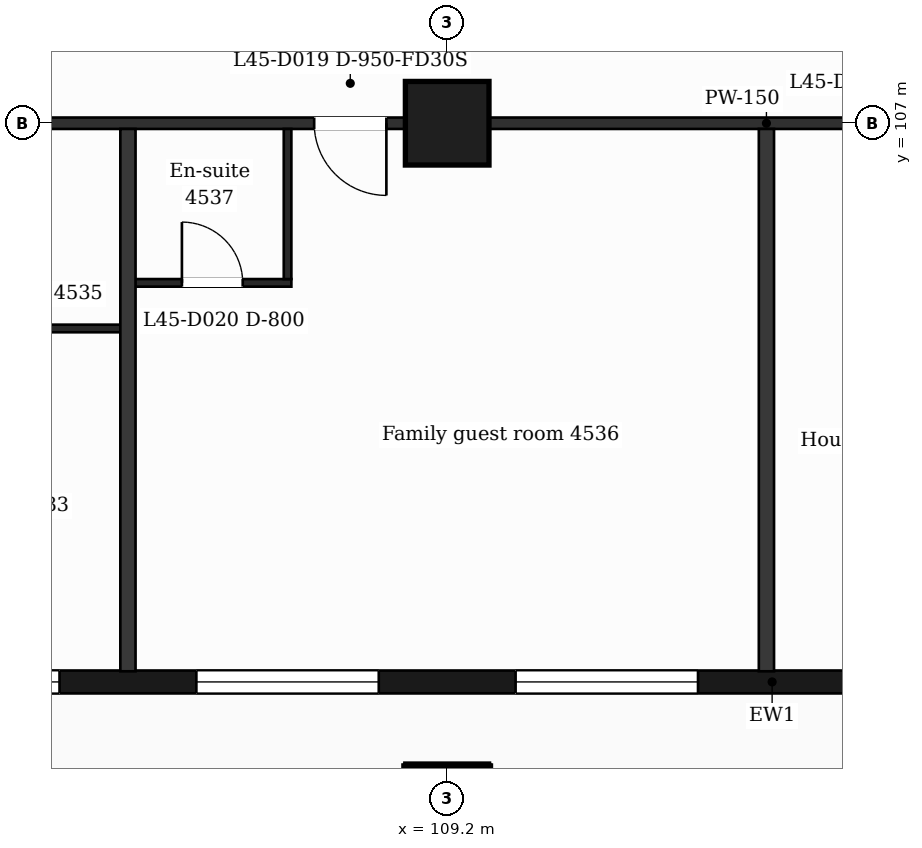
"""IFC4 building model, lengths in metres.
Left out: names, types, materials, properties, quantities, classifications, styles, units other than length and angle.
Written with IfcOpenShell. Run it as: python <this file> out.ifc"""

import sys

from ifc_helpers import new_model, si_unit, direction, frame, frame_2d, origin, origin_2d, place, context, subcontext, project, spatial, rectangle, extrude, element, fill, save


model = new_model("IFC4")
c1 = context("Model", 3, precision=1e-05, world=origin(), true_north=direction((0.0, 1.0)))
c2 = subcontext(c1, "Body", "Model", "MODEL_VIEW")
j1 = project(units=[si_unit("LENGTHUNIT", "METRE"), si_unit("PLANEANGLEUNIT", "RADIAN")], contexts=[c1])
p1 = place(None, origin())
s1 = spatial("IfcSite", under=j1, at=p1, CompositionType="ELEMENT")
p2 = place(p1, origin())
s2 = spatial("IfcBuilding", under=s1, at=p2, CompositionType="ELEMENT")
p3 = place(p2, frame((0.0, 0.0, 188.5)))
s3 = spatial("IfcBuildingStorey", under=s2, at=p3, CompositionType="ELEMENT", Elevation=188.5)
for number, where, z_axis, x_axis in (
    (1, (109.2, 98.0, 0.0), (0.0, 0.0, 1.0), (1.0, 0.0, 0.0)),
    (2, (109.2, 107.0, 0.0), (0.0, 0.0, 1.0), (1.0, 0.0, 0.0)),
):
    element("IfcColumn", number, at=place(p3, frame(where, z_axis=z_axis, x_axis=x_axis)), inside=s3, PredefinedType="COLUMN", context=c2, shape_type="SweptSolid", body=[
        extrude(rectangle(XDim=1.1, YDim=1.1, at=origin_2d()), origin(), (0.0, 0.0, 1.0), 3.7),
    ])
p4 = place(p3, frame((89.85, 99.65, 0.0), z_axis=(0.0, 0.0, 1.0), x_axis=(1.0, 0.0, 0.0)))
e3 = element("IfcWall", 3, at=p4, inside=s3, PredefinedType="SOLIDWALL", context=c2, shape_type="SweptSolid", body=[
    extrude(rectangle(XDim=47.25, YDim=0.3, at=frame_2d((23.625, 0.0))), origin(), (0.0, 0.0, 1.0), 3.25),
])
p5 = place(p4, frame((0.725, 0.0, 0.9)))
e4 = element("IfcOpeningElement", 4, at=p5, cuts=e3, PredefinedType="OPENING", context=c2, shape_type="SweptSolid", body=[
    extrude(rectangle(XDim=1.2, YDim=2.1, at=frame_2d((0.6, 1.05))), frame((0.0, 0.16, 0.0), z_axis=(0.0, -1.0, 0.0), x_axis=(1.0, 0.0, 0.0)), (0.0, 0.0, 1.0), 0.32),
])
p6 = place(p4, frame((3.45, 0.0, 0.9)))
e5 = element("IfcOpeningElement", 5, at=p6, cuts=e3, PredefinedType="OPENING", context=c2, shape_type="SweptSolid", body=[
    extrude(rectangle(XDim=2.4, YDim=2.1, at=frame_2d((1.2, 1.05))), frame((0.0, 0.16, 0.0), z_axis=(0.0, -1.0, 0.0), x_axis=(1.0, 0.0, 0.0)), (0.0, 0.0, 1.0), 0.32),
])
p7 = place(p4, frame((7.65, 0.0, 0.9)))
e6 = element("IfcOpeningElement", 6, at=p7, cuts=e3, PredefinedType="OPENING", context=c2, shape_type="SweptSolid", body=[
    extrude(rectangle(XDim=2.4, YDim=2.1, at=frame_2d((1.2, 1.05))), frame((0.0, 0.16, 0.0), z_axis=(0.0, -1.0, 0.0), x_axis=(1.0, 0.0, 0.0)), (0.0, 0.0, 1.0), 0.32),
])
p8 = place(p4, frame((11.85, 0.0, 0.9)))
e7 = element("IfcOpeningElement", 7, at=p8, cuts=e3, PredefinedType="OPENING", context=c2, shape_type="SweptSolid", body=[
    extrude(rectangle(XDim=2.4, YDim=2.1, at=frame_2d((1.2, 1.05))), frame((0.0, 0.16, 0.0), z_axis=(0.0, -1.0, 0.0), x_axis=(1.0, 0.0, 0.0)), (0.0, 0.0, 1.0), 0.32),
])
p9 = place(p4, frame((16.05, 0.0, 0.9)))
e8 = element("IfcOpeningElement", 8, at=p9, cuts=e3, PredefinedType="OPENING", context=c2, shape_type="SweptSolid", body=[
    extrude(rectangle(XDim=2.4, YDim=2.1, at=frame_2d((1.2, 1.05))), frame((0.0, 0.16, 0.0), z_axis=(0.0, -1.0, 0.0), x_axis=(1.0, 0.0, 0.0)), (0.0, 0.0, 1.0), 0.32),
])
p10 = place(p4, frame((20.25, 0.0, 0.9)))
e9 = element("IfcOpeningElement", 9, at=p10, cuts=e3, PredefinedType="OPENING", context=c2, shape_type="SweptSolid", body=[
    extrude(rectangle(XDim=2.4, YDim=2.1, at=frame_2d((1.2, 1.05))), frame((0.0, 0.16, 0.0), z_axis=(0.0, -1.0, 0.0), x_axis=(1.0, 0.0, 0.0)), (0.0, 0.0, 1.0), 0.32),
])
p11 = place(p4, frame((25.05, 0.0, 0.9)))
e10 = element("IfcOpeningElement", 10, at=p11, cuts=e3, PredefinedType="OPENING", context=c2, shape_type="SweptSolid", body=[
    extrude(rectangle(XDim=1.2, YDim=2.1, at=frame_2d((0.6, 1.05))), frame((0.0, 0.16, 0.0), z_axis=(0.0, -1.0, 0.0), x_axis=(1.0, 0.0, 0.0)), (0.0, 0.0, 1.0), 0.32),
])
p12 = place(p4, frame((29.25, 0.0, 0.9)))
e11 = element("IfcOpeningElement", 11, at=p12, cuts=e3, PredefinedType="OPENING", context=c2, shape_type="SweptSolid", body=[
    extrude(rectangle(XDim=1.2, YDim=2.1, at=frame_2d((0.6, 1.05))), frame((0.0, 0.16, 0.0), z_axis=(0.0, -1.0, 0.0), x_axis=(1.0, 0.0, 0.0)), (0.0, 0.0, 1.0), 0.32),
])
p13 = place(p4, frame((32.55, 0.0, 0.0)))
e12 = element("IfcOpeningElement", 12, at=p13, cuts=e3, PredefinedType="OPENING", context=c2, shape_type="SweptSolid", body=[
    extrude(rectangle(XDim=1.2, YDim=2.4, at=frame_2d((0.6, 1.2))), frame((0.0, 0.16, 0.0), z_axis=(0.0, -1.0, 0.0), x_axis=(1.0, 0.0, 0.0)), (0.0, 0.0, 1.0), 0.32),
])
p14 = place(p4, frame((34.35, 0.0, 0.9)))
e13 = element("IfcOpeningElement", 13, at=p14, cuts=e3, PredefinedType="OPENING", context=c2, shape_type="SweptSolid", body=[
    extrude(rectangle(XDim=1.2, YDim=2.1, at=frame_2d((0.6, 1.05))), frame((0.0, 0.16, 0.0), z_axis=(0.0, -1.0, 0.0), x_axis=(1.0, 0.0, 0.0)), (0.0, 0.0, 1.0), 0.32),
])
p15 = place(p4, frame((37.05, 0.0, 0.9)))
e14 = element("IfcOpeningElement", 14, at=p15, cuts=e3, PredefinedType="OPENING", context=c2, shape_type="SweptSolid", body=[
    extrude(rectangle(XDim=2.4, YDim=2.1, at=frame_2d((1.2, 1.05))), frame((0.0, 0.16, 0.0), z_axis=(0.0, -1.0, 0.0), x_axis=(1.0, 0.0, 0.0)), (0.0, 0.0, 1.0), 0.32),
])
p16 = place(p4, frame((40.95, 0.0, 0.0)))
e15 = element("IfcOpeningElement", 15, at=p16, cuts=e3, PredefinedType="OPENING", context=c2, shape_type="SweptSolid", body=[
    extrude(rectangle(XDim=1.2, YDim=2.4, at=frame_2d((0.6, 1.2))), frame((0.0, 0.16, 0.0), z_axis=(0.0, -1.0, 0.0), x_axis=(1.0, 0.0, 0.0)), (0.0, 0.0, 1.0), 0.32),
])
p17 = place(p4, frame((42.75, 0.0, 0.9)))
e16 = element("IfcOpeningElement", 16, at=p17, cuts=e3, PredefinedType="OPENING", context=c2, shape_type="SweptSolid", body=[
    extrude(rectangle(XDim=1.2, YDim=2.1, at=frame_2d((0.6, 1.05))), frame((0.0, 0.16, 0.0), z_axis=(0.0, -1.0, 0.0), x_axis=(1.0, 0.0, 0.0)), (0.0, 0.0, 1.0), 0.32),
])
p18 = place(p4, frame((45.25, 0.0, 0.9)))
e17 = element("IfcOpeningElement", 17, at=p18, cuts=e3, PredefinedType="OPENING", context=c2, shape_type="SweptSolid", body=[
    extrude(rectangle(XDim=1.2, YDim=2.1, at=frame_2d((0.6, 1.05))), frame((0.0, 0.16, 0.0), z_axis=(0.0, -1.0, 0.0), x_axis=(1.0, 0.0, 0.0)), (0.0, 0.0, 1.0), 0.32),
])
p19 = place(p3, frame((102.55, 104.3, 0.0), z_axis=(0.0, 0.0, 1.0), x_axis=(1.0, 0.0, 0.0)))
e18 = element("IfcWall", 18, at=p19, inside=s3, PredefinedType="PARTITIONING", context=c2, shape_type="SweptSolid", body=[
    extrude(rectangle(XDim=2.45, YDim=0.1, at=frame_2d((1.225, 0.0))), origin(), (0.0, 0.0, 1.0), 3.25),
])
p20 = place(p3, frame((105.0, 104.9, 0.0), z_axis=(0.0, 0.0, 1.0), x_axis=(1.0, 0.0, 0.0)))
e19 = element("IfcWall", 19, at=p20, inside=s3, PredefinedType="PARTITIONING", context=c2, shape_type="SweptSolid", body=[
    extrude(rectangle(XDim=2.15, YDim=0.1, at=frame_2d((1.075, 0.0))), origin(), (0.0, 0.0, 1.0), 3.25),
])
p21 = place(p20, frame((0.71, 0.0, 0.0)))
e20 = element("IfcOpeningElement", 20, at=p21, cuts=e19, PredefinedType="OPENING", context=c2, shape_type="SweptSolid", body=[
    extrude(rectangle(XDim=0.8, YDim=2.1, at=frame_2d((0.4, 1.05))), frame((0.0, 0.06, 0.0), z_axis=(0.0, -1.0, 0.0), x_axis=(1.0, 0.0, 0.0)), (0.0, 0.0, 1.0), 0.12),
])
p22 = place(p3, frame((87.018, 107.0, 0.0), z_axis=(0.0, 0.0, 1.0), x_axis=(1.0, 0.0, 0.0)))
e21 = element("IfcWall", 21, at=p22, inside=s3, PredefinedType="PARTITIONING", context=c2, shape_type="SweptSolid", body=[
    extrude(rectangle(XDim=52.765, YDim=0.15, at=frame_2d((26.382, 0.0))), origin(), (0.0, 0.0, 1.0), 3.25),
])
p23 = place(p22, frame((0.87, 0.0, 0.0)))
e22 = element("IfcOpeningElement", 22, at=p23, cuts=e21, PredefinedType="OPENING", context=c2, shape_type="SweptSolid", body=[
    extrude(rectangle(XDim=0.95, YDim=2.1, at=frame_2d((0.475, 1.05))), frame((0.0, 0.085, 0.0), z_axis=(0.0, -1.0, 0.0), x_axis=(1.0, 0.0, 0.0)), (0.0, 0.0, 1.0), 0.17),
])
p24 = place(p22, frame((10.757, 0.0, 0.0)))
e23 = element("IfcOpeningElement", 23, at=p24, cuts=e21, PredefinedType="OPENING", context=c2, shape_type="SweptSolid", body=[
    extrude(rectangle(XDim=1.0, YDim=2.1, at=frame_2d((0.5, 1.05))), frame((0.0, 0.085, 0.0), z_axis=(0.0, -1.0, 0.0), x_axis=(1.0, 0.0, 0.0)), (0.0, 0.0, 1.0), 0.17),
])
p25 = place(p22, frame((20.432, 0.0, 0.0)))
e24 = element("IfcOpeningElement", 24, at=p25, cuts=e21, PredefinedType="OPENING", context=c2, shape_type="SweptSolid", body=[
    extrude(rectangle(XDim=0.95, YDim=2.1, at=frame_2d((0.475, 1.05))), frame((0.0, 0.085, 0.0), z_axis=(0.0, -1.0, 0.0), x_axis=(1.0, 0.0, 0.0)), (0.0, 0.0, 1.0), 0.17),
])
p26 = place(p22, frame((27.752, 0.0, 0.0)))
e25 = element("IfcOpeningElement", 25, at=p26, cuts=e21, PredefinedType="OPENING", context=c2, shape_type="SweptSolid", body=[
    extrude(rectangle(XDim=0.95, YDim=2.1, at=frame_2d((0.475, 1.05))), frame((0.0, 0.085, 0.0), z_axis=(0.0, -1.0, 0.0), x_axis=(1.0, 0.0, 0.0)), (0.0, 0.0, 1.0), 0.17),
])
p27 = place(p22, frame((33.557, 0.0, 0.0)))
e26 = element("IfcOpeningElement", 26, at=p27, cuts=e21, PredefinedType="OPENING", context=c2, shape_type="SweptSolid", body=[
    extrude(rectangle(XDim=0.95, YDim=2.1, at=frame_2d((0.475, 1.05))), frame((0.0, 0.085, 0.0), z_axis=(0.0, -1.0, 0.0), x_axis=(1.0, 0.0, 0.0)), (0.0, 0.0, 1.0), 0.17),
])
p28 = place(p22, frame((35.057, 0.0, 0.0)))
e27 = element("IfcOpeningElement", 27, at=p28, cuts=e21, PredefinedType="OPENING", context=c2, shape_type="SweptSolid", body=[
    extrude(rectangle(XDim=0.95, YDim=2.1, at=frame_2d((0.475, 1.05))), frame((0.0, 0.085, 0.0), z_axis=(0.0, -1.0, 0.0), x_axis=(1.0, 0.0, 0.0)), (0.0, 0.0, 1.0), 0.17),
])
p29 = place(p22, frame((45.407, 0.0, 0.0)))
e28 = element("IfcOpeningElement", 28, at=p29, cuts=e21, PredefinedType="OPENING", context=c2, shape_type="SweptSolid", body=[
    extrude(rectangle(XDim=1.0, YDim=2.1, at=frame_2d((0.5, 1.05))), frame((0.0, 0.085, 0.0), z_axis=(0.0, -1.0, 0.0), x_axis=(1.0, 0.0, 0.0)), (0.0, 0.0, 1.0), 0.17),
])
p30 = place(p22, frame((49.285, 0.0, 0.0)))
e29 = element("IfcOpeningElement", 29, at=p30, cuts=e21, PredefinedType="OPENING", context=c2, shape_type="SweptSolid", body=[
    extrude(rectangle(XDim=0.95, YDim=2.1, at=frame_2d((0.475, 1.05))), frame((0.0, 0.085, 0.0), z_axis=(0.0, -1.0, 0.0), x_axis=(1.0, 0.0, 0.0)), (0.0, 0.0, 1.0), 0.17),
])
p31 = place(p3, frame((105.0, 99.79, 0.0), z_axis=(0.0, 0.0, 1.0), x_axis=(0.0, 1.0, 0.0)))
e30 = element("IfcWall", 30, at=p31, inside=s3, PredefinedType="PARTITIONING", context=c2, shape_type="SweptSolid", body=[
    extrude(rectangle(XDim=7.135, YDim=0.2, at=frame_2d((3.567, 0.0))), origin(), (0.0, 0.0, 1.0), 3.25),
])
p32 = place(p3, frame((107.1, 104.95, 0.0), z_axis=(0.0, 0.0, 1.0), x_axis=(0.0, 1.0, 0.0)))
e31 = element("IfcWall", 31, at=p32, inside=s3, PredefinedType="PARTITIONING", context=c2, shape_type="SweptSolid", body=[
    extrude(rectangle(XDim=1.975, YDim=0.1, at=frame_2d((0.988, 0.0))), origin(), (0.0, 0.0, 1.0), 3.25),
])
p33 = place(p3, frame((113.4, 99.79, 0.0), z_axis=(0.0, 0.0, 1.0), x_axis=(0.0, 1.0, 0.0)))
e32 = element("IfcWall", 32, at=p33, inside=s3, PredefinedType="PARTITIONING", context=c2, shape_type="SweptSolid", body=[
    extrude(rectangle(XDim=7.135, YDim=0.2, at=frame_2d((3.567, 0.0))), origin(), (0.0, 0.0, 1.0), 3.25),
])
p34 = place(p8, origin())
e33 = element("IfcWindow", 33, at=p34, inside=s3, PartitioningType="SINGLE_PANEL", PredefinedType="WINDOW", context=c2, shape_type="SweptSolid", body=[
    extrude(rectangle(XDim=2.4, YDim=2.1, at=frame_2d((1.2, 1.05))), frame((0.0, 0.03, 0.0), z_axis=(0.0, -1.0, 0.0), x_axis=(1.0, 0.0, 0.0)), (0.0, 0.0, 1.0), 0.06),
])
fill(e7, e33)
p35 = place(p9, origin())
e34 = element("IfcWindow", 34, at=p35, inside=s3, PartitioningType="SINGLE_PANEL", PredefinedType="WINDOW", context=c2, shape_type="SweptSolid", body=[
    extrude(rectangle(XDim=2.4, YDim=2.1, at=frame_2d((1.2, 1.05))), frame((0.0, 0.03, 0.0), z_axis=(0.0, -1.0, 0.0), x_axis=(1.0, 0.0, 0.0)), (0.0, 0.0, 1.0), 0.06),
])
fill(e8, e34)
p36 = place(p10, origin())
e35 = element("IfcWindow", 35, at=p36, inside=s3, PartitioningType="SINGLE_PANEL", PredefinedType="WINDOW", context=c2, shape_type="SweptSolid", body=[
    extrude(rectangle(XDim=2.4, YDim=2.1, at=frame_2d((1.2, 1.05))), frame((0.0, 0.03, 0.0), z_axis=(0.0, -1.0, 0.0), x_axis=(1.0, 0.0, 0.0)), (0.0, 0.0, 1.0), 0.06),
])
fill(e9, e35)
p37 = place(p25, origin())
e36 = element("IfcDoor", 36, at=p37, inside=s3, OperationType="SINGLE_SWING_RIGHT", PredefinedType="DOOR", context=c2, shape_type="SweptSolid", body=[
    extrude(rectangle(XDim=0.95, YDim=2.1, at=frame_2d((0.475, 1.05))), frame((0.0, 0.025, 0.0), z_axis=(0.0, -1.0, 0.0), x_axis=(1.0, 0.0, 0.0)), (0.0, 0.0, 1.0), 0.05),
])
fill(e24, e36)
p38 = place(p21, origin())
e37 = element("IfcDoor", 37, at=p38, inside=s3, OperationType="SINGLE_SWING_LEFT", PredefinedType="DOOR", context=c2, shape_type="SweptSolid", body=[
    extrude(rectangle(XDim=0.8, YDim=2.1, at=frame_2d((0.4, 1.05))), frame((0.0, 0.025, 0.0), z_axis=(0.0, -1.0, 0.0), x_axis=(1.0, 0.0, 0.0)), (0.0, 0.0, 1.0), 0.05),
])
fill(e20, e37)
save(model, sys.argv[1])
